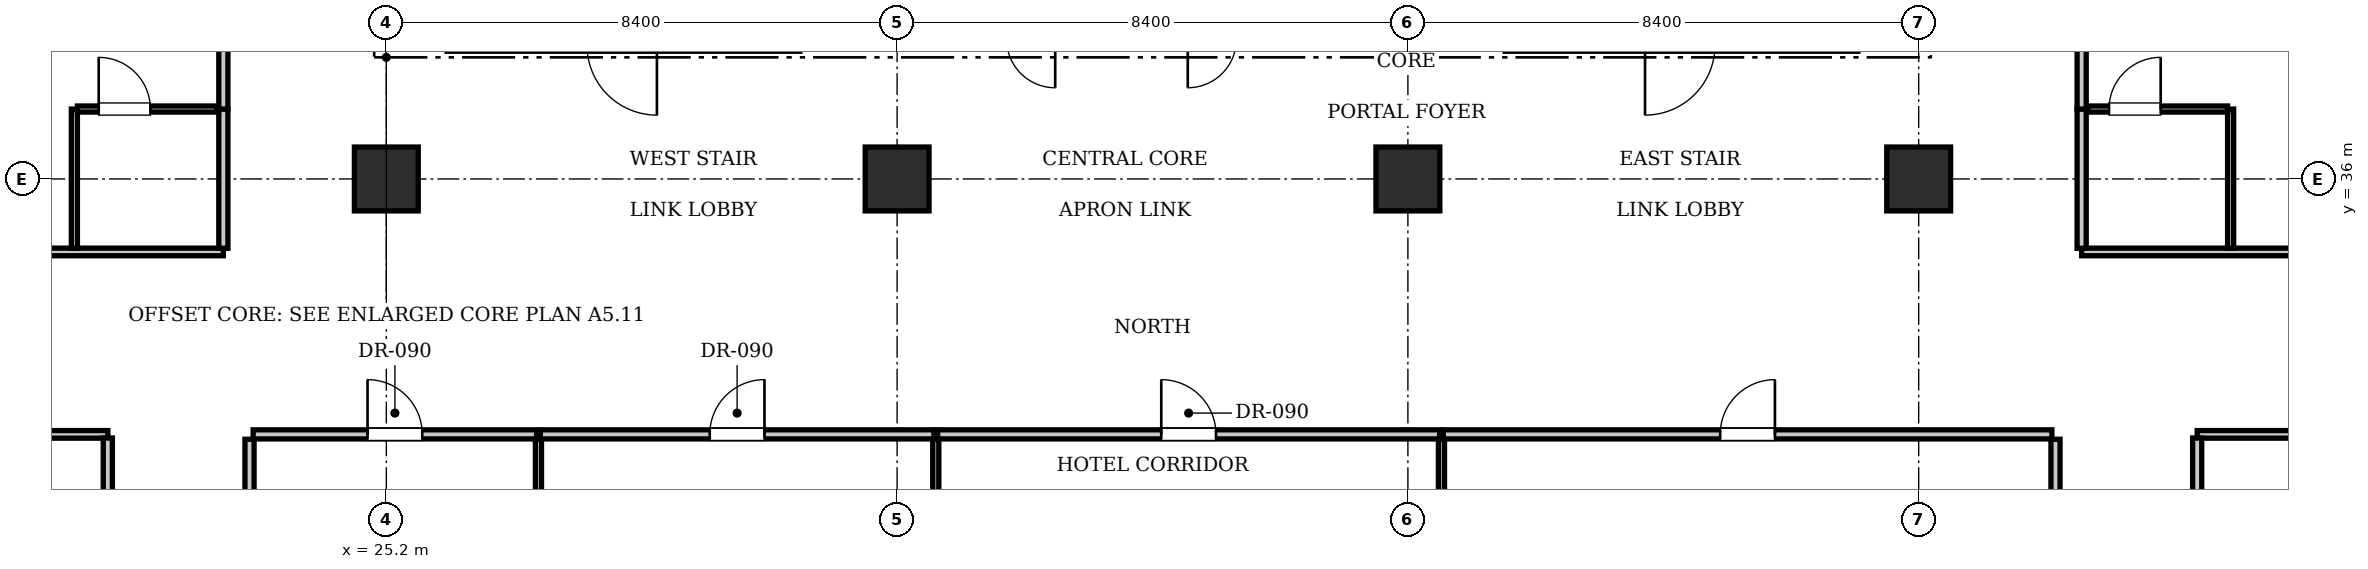
"""IFC4 building model, lengths in metres.
Left out: names, types, materials, properties, quantities, classifications, styles, units other than length and angle.
Written with IfcOpenShell. Run it as: python <this file> out.ifc"""

import sys

from ifc_helpers import new_model, si_unit, direction, frame, frame_2d, origin, origin_2d, place, context, subcontext, project, spatial, rectangle, extrude, element, fill, save


model = new_model("IFC4")
c1 = context("Model", 3, precision=1e-05, world=origin(), true_north=direction((0.0, 1.0)))
c2 = subcontext(c1, "Body", "Model", "MODEL_VIEW")
j1 = project(units=[si_unit("LENGTHUNIT", "METRE"), si_unit("PLANEANGLEUNIT", "RADIAN")], contexts=[c1])
p1 = place(None, origin())
s1 = spatial("IfcSite", under=j1, at=p1, CompositionType="ELEMENT")
p2 = place(p1, origin())
s2 = spatial("IfcBuilding", under=s1, at=p2, CompositionType="ELEMENT")
p3 = place(p2, frame((0.0, 0.0, 96.25)))
s3 = spatial("IfcBuildingStorey", under=s2, at=p3, CompositionType="ELEMENT", Elevation=96.25)
for number, where, z_axis, x_axis in (
    (1, (25.2, 36.0, 0.0), (0.0, 0.0, 1.0), (1.0, 0.0, 0.0)),
    (2, (33.6, 36.0, 0.0), (0.0, 0.0, 1.0), (1.0, 0.0, 0.0)),
    (3, (42.0, 36.0, 0.0), (0.0, 0.0, 1.0), (1.0, 0.0, 0.0)),
    (4, (50.4, 36.0, 0.0), (0.0, 0.0, 1.0), (1.0, 0.0, 0.0)),
):
    element("IfcColumn", number, at=place(p3, frame(where, z_axis=z_axis, x_axis=x_axis)), inside=s3, PredefinedType="COLUMN", context=c2, shape_type="SweptSolid", body=[
        extrude(rectangle(XDim=1.05, YDim=1.05, at=origin_2d()), origin(), (0.0, 0.0, 1.0), 3.85),
    ])
for number, where, z_axis, x_axis in (
    (5, (22.95, 23.28, 0.0), (0.0, 0.0, 1.0), (0.0, 1.0, 0.0)),
    (6, (52.65, 23.28, 0.0), (0.0, 0.0, 1.0), (0.0, 1.0, 0.0)),
):
    element("IfcWall", number, at=place(p3, frame(where, z_axis=z_axis, x_axis=x_axis)), inside=s3, PredefinedType="PARTITIONING", context=c2, shape_type="SweptSolid", body=[
        extrude(rectangle(XDim=8.44, YDim=0.15, at=frame_2d((4.22, 0.0))), origin(), (0.0, 0.0, 1.0), 3.61),
    ])
p4 = place(p3, frame((23.01, 31.8, 0.0), z_axis=(0.0, 0.0, 1.0), x_axis=(1.0, 0.0, 0.0)))
e7 = element("IfcWall", 7, at=p4, inside=s3, PredefinedType="PARTITIONING", context=c2, shape_type="SweptSolid", body=[
    extrude(rectangle(XDim=4.662, YDim=0.15, at=frame_2d((2.331, 0.0))), origin(), (0.0, 0.0, 1.0), 3.61),
])
p5 = place(p4, frame((1.881, 0.0, 0.0)))
e8 = element("IfcOpeningElement", 8, at=p5, cuts=e7, PredefinedType="OPENING", context=c2, shape_type="SweptSolid", body=[
    extrude(rectangle(XDim=0.9, YDim=2.1, at=frame_2d((0.45, 1.05))), frame((0.0, 0.085, 0.0), z_axis=(0.0, -1.0, 0.0), x_axis=(1.0, 0.0, 0.0)), (0.0, 0.0, 1.0), 0.17),
])
p6 = place(p3, frame((27.702, 23.28, 0.0), z_axis=(0.0, 0.0, 1.0), x_axis=(0.0, 1.0, 0.0)))
e9 = element("IfcWall", 9, at=p6, inside=s3, PredefinedType="PARTITIONING", context=c2, shape_type="SweptSolid", body=[
    extrude(rectangle(XDim=8.44, YDim=0.1, at=frame_2d((4.22, 0.0))), origin(), (0.0, 0.0, 1.0), 3.61),
])
p7 = place(p3, frame((27.732, 31.8, 0.0), z_axis=(0.0, 0.0, 1.0), x_axis=(1.0, 0.0, 0.0)))
e10 = element("IfcWall", 10, at=p7, inside=s3, PredefinedType="PARTITIONING", context=c2, shape_type="SweptSolid", body=[
    extrude(rectangle(XDim=6.474, YDim=0.15, at=frame_2d((3.237, 0.0))), origin(), (0.0, 0.0, 1.0), 3.61),
])
p8 = place(p7, frame((2.787, 0.0, 0.0)))
e11 = element("IfcOpeningElement", 11, at=p8, cuts=e10, PredefinedType="OPENING", context=c2, shape_type="SweptSolid", body=[
    extrude(rectangle(XDim=0.9, YDim=2.1, at=frame_2d((0.45, 1.05))), frame((0.0, 0.085, 0.0), z_axis=(0.0, -1.0, 0.0), x_axis=(1.0, 0.0, 0.0)), (0.0, 0.0, 1.0), 0.17),
])
p9 = place(p3, frame((34.236, 23.28, 0.0), z_axis=(0.0, 0.0, 1.0), x_axis=(0.0, 1.0, 0.0)))
e12 = element("IfcWall", 12, at=p9, inside=s3, PredefinedType="PARTITIONING", context=c2, shape_type="SweptSolid", body=[
    extrude(rectangle(XDim=8.44, YDim=0.1, at=frame_2d((4.22, 0.0))), origin(), (0.0, 0.0, 1.0), 3.61),
])
p10 = place(p3, frame((34.266, 31.8, 0.0), z_axis=(0.0, 0.0, 1.0), x_axis=(1.0, 0.0, 0.0)))
e13 = element("IfcWall", 13, at=p10, inside=s3, PredefinedType="PARTITIONING", context=c2, shape_type="SweptSolid", body=[
    extrude(rectangle(XDim=8.256, YDim=0.15, at=frame_2d((4.128, 0.0))), origin(), (0.0, 0.0, 1.0), 3.61),
])
p11 = place(p10, frame((3.678, 0.0, 0.0)))
e14 = element("IfcOpeningElement", 14, at=p11, cuts=e13, PredefinedType="OPENING", context=c2, shape_type="SweptSolid", body=[
    extrude(rectangle(XDim=0.9, YDim=2.1, at=frame_2d((0.45, 1.05))), frame((0.0, 0.085, 0.0), z_axis=(0.0, -1.0, 0.0), x_axis=(1.0, 0.0, 0.0)), (0.0, 0.0, 1.0), 0.17),
])
p12 = place(p3, frame((42.552, 23.28, 0.0), z_axis=(0.0, 0.0, 1.0), x_axis=(0.0, 1.0, 0.0)))
e15 = element("IfcWall", 15, at=p12, inside=s3, PredefinedType="PARTITIONING", context=c2, shape_type="SweptSolid", body=[
    extrude(rectangle(XDim=8.44, YDim=0.1, at=frame_2d((4.22, 0.0))), origin(), (0.0, 0.0, 1.0), 3.61),
])
p13 = place(p3, frame((42.582, 31.8, 0.0), z_axis=(0.0, 0.0, 1.0), x_axis=(1.0, 0.0, 0.0)))
e16 = element("IfcWall", 16, at=p13, inside=s3, PredefinedType="PARTITIONING", context=c2, shape_type="SweptSolid", body=[
    extrude(rectangle(XDim=10.008, YDim=0.15, at=frame_2d((5.004, 0.0))), origin(), (0.0, 0.0, 1.0), 3.61),
])
p14 = place(p13, frame((4.554, 0.0, 0.0)))
e17 = element("IfcOpeningElement", 17, at=p14, cuts=e16, PredefinedType="OPENING", context=c2, shape_type="SweptSolid", body=[
    extrude(rectangle(XDim=0.9, YDim=2.1, at=frame_2d((0.45, 1.05))), frame((0.0, 0.085, 0.0), z_axis=(0.0, -1.0, 0.0), x_axis=(1.0, 0.0, 0.0)), (0.0, 0.0, 1.0), 0.17),
])
p15 = place(p3, frame((10.9, 31.8, 0.0), z_axis=(0.0, 0.0, 1.0), x_axis=(1.0, 0.0, 0.0)))
e18 = element("IfcWall", 18, at=p15, inside=s3, PredefinedType="PARTITIONING", context=c2, shape_type="SweptSolid", body=[
    extrude(rectangle(XDim=9.72, YDim=0.125, at=frame_2d((4.86, 0.0))), origin(), (0.0, 0.0, 1.0), 3.61),
])
p16 = place(p3, frame((54.98, 31.8, 0.0), z_axis=(0.0, 0.0, 1.0), x_axis=(1.0, 0.0, 0.0)))
e19 = element("IfcWall", 19, at=p16, inside=s3, PredefinedType="PARTITIONING", context=c2, shape_type="SweptSolid", body=[
    extrude(rectangle(XDim=9.72, YDim=0.125, at=frame_2d((4.86, 0.0))), origin(), (0.0, 0.0, 1.0), 3.61),
])
for number, where, z_axis, x_axis in (
    (20, (20.62, 29.72, 0.0), (0.0, 0.0, 1.0), (0.0, 1.0, 0.0)),
    (21, (54.98, 29.72, 0.0), (0.0, 0.0, 1.0), (0.0, 1.0, 0.0)),
):
    element("IfcWall", number, at=place(p3, frame(where, z_axis=z_axis, x_axis=x_axis)), inside=s3, PredefinedType="PARTITIONING", context=c2, shape_type="SweptSolid", body=[
        extrude(rectangle(XDim=2.02, YDim=0.15, at=frame_2d((1.01, 0.0))), origin(), (0.0, 0.0, 1.0), 3.61),
    ])
p17 = place(p3, frame((10.9, 34.8, 0.0), z_axis=(0.0, 0.0, 1.0), x_axis=(1.0, 0.0, 0.0)))
e22 = element("IfcWall", 22, at=p17, inside=s3, PredefinedType="PARTITIONING", context=c2, shape_type="SweptSolid", body=[
    extrude(rectangle(XDim=11.62, YDim=0.125, at=frame_2d((5.81, 0.0))), origin(), (0.0, 0.0, 1.0), 3.61),
])
p18 = place(p3, frame((53.08, 34.8, 0.0), z_axis=(0.0, 0.0, 1.0), x_axis=(1.0, 0.0, 0.0)))
e23 = element("IfcWall", 23, at=p18, inside=s3, PredefinedType="PARTITIONING", context=c2, shape_type="SweptSolid", body=[
    extrude(rectangle(XDim=11.62, YDim=0.125, at=frame_2d((5.81, 0.0))), origin(), (0.0, 0.0, 1.0), 3.61),
])
p19 = place(p3, frame((22.52, 34.86, 0.0), z_axis=(0.0, 0.0, 1.0), x_axis=(0.0, 1.0, 0.0)))
e24 = element("IfcWall", 24, at=p19, inside=s3, PredefinedType="PARTITIONING", context=c2, shape_type="SweptSolid", body=[
    extrude(rectangle(XDim=2.29, YDim=0.15, at=frame_2d((1.145, 0.0))), origin(), (0.0, 0.0, 1.0), 3.61),
])
p20 = place(p3, frame((22.52, 37.15, 0.0), z_axis=(0.0, 0.0, 1.0), x_axis=(0.0, 1.0, 0.0)))
e25 = element("IfcWall", 25, at=p20, inside=s3, PredefinedType="PARTITIONING", context=c2, shape_type="SweptSolid", body=[
    extrude(rectangle(XDim=5.359, YDim=0.15, at=frame_2d((2.679, 0.0))), origin(), (0.0, 0.0, 1.0), 3.61),
])
p21 = place(p20, frame((2.204, 0.0, 0.0)))
e26 = element("IfcOpeningElement", 26, at=p21, cuts=e25, PredefinedType="OPENING", context=c2, shape_type="SweptSolid", body=[
    extrude(rectangle(XDim=0.95, YDim=2.15, at=frame_2d((0.475, 1.075))), frame((0.0, 0.085, 0.0), z_axis=(0.0, -1.0, 0.0), x_axis=(1.0, 0.0, 0.0)), (0.0, 0.0, 1.0), 0.17),
])
p22 = place(p3, frame((20.07, 34.86, 0.0), z_axis=(0.0, 0.0, 1.0), x_axis=(0.0, 1.0, 0.0)))
e27 = element("IfcWall", 27, at=p22, inside=s3, PredefinedType="PARTITIONING", context=c2, shape_type="SweptSolid", body=[
    extrude(rectangle(XDim=2.29, YDim=0.1, at=frame_2d((1.145, 0.0))), origin(), (0.0, 0.0, 1.0), 3.61),
])
p23 = place(p3, frame((20.12, 37.15, 0.0), z_axis=(0.0, 0.0, 1.0), x_axis=(1.0, 0.0, 0.0)))
e28 = element("IfcWall", 28, at=p23, inside=s3, PredefinedType="PARTITIONING", context=c2, shape_type="SweptSolid", body=[
    extrude(rectangle(XDim=2.3, YDim=0.1, at=frame_2d((1.15, 0.0))), origin(), (0.0, 0.0, 1.0), 3.61),
])
p24 = place(p23, frame((0.35, 0.0, 0.0)))
e29 = element("IfcOpeningElement", 29, at=p24, cuts=e28, PredefinedType="OPENING", context=c2, shape_type="SweptSolid", body=[
    extrude(rectangle(XDim=0.85, YDim=2.1, at=frame_2d((0.425, 1.05))), frame((0.0, 0.06, 0.0), z_axis=(0.0, -1.0, 0.0), x_axis=(1.0, 0.0, 0.0)), (0.0, 0.0, 1.0), 0.12),
])
p25 = place(p3, frame((53.08, 34.86, 0.0), z_axis=(0.0, 0.0, 1.0), x_axis=(0.0, 1.0, 0.0)))
e30 = element("IfcWall", 30, at=p25, inside=s3, PredefinedType="PARTITIONING", context=c2, shape_type="SweptSolid", body=[
    extrude(rectangle(XDim=2.29, YDim=0.15, at=frame_2d((1.145, 0.0))), origin(), (0.0, 0.0, 1.0), 3.61),
])
p26 = place(p3, frame((53.08, 37.15, 0.0), z_axis=(0.0, 0.0, 1.0), x_axis=(0.0, 1.0, 0.0)))
e31 = element("IfcWall", 31, at=p26, inside=s3, PredefinedType="PARTITIONING", context=c2, shape_type="SweptSolid", body=[
    extrude(rectangle(XDim=5.359, YDim=0.15, at=frame_2d((2.679, 0.0))), origin(), (0.0, 0.0, 1.0), 3.61),
])
p27 = place(p26, frame((2.204, 0.0, 0.0)))
e32 = element("IfcOpeningElement", 32, at=p27, cuts=e31, PredefinedType="OPENING", context=c2, shape_type="SweptSolid", body=[
    extrude(rectangle(XDim=0.95, YDim=2.15, at=frame_2d((0.475, 1.075))), frame((0.0, 0.085, 0.0), z_axis=(0.0, -1.0, 0.0), x_axis=(1.0, 0.0, 0.0)), (0.0, 0.0, 1.0), 0.17),
])
p28 = place(p3, frame((55.53, 34.86, 0.0), z_axis=(0.0, 0.0, 1.0), x_axis=(0.0, 1.0, 0.0)))
e33 = element("IfcWall", 33, at=p28, inside=s3, PredefinedType="PARTITIONING", context=c2, shape_type="SweptSolid", body=[
    extrude(rectangle(XDim=2.29, YDim=0.1, at=frame_2d((1.145, 0.0))), origin(), (0.0, 0.0, 1.0), 3.61),
])
p29 = place(p3, frame((53.18, 37.15, 0.0), z_axis=(0.0, 0.0, 1.0), x_axis=(1.0, 0.0, 0.0)))
e34 = element("IfcWall", 34, at=p29, inside=s3, PredefinedType="PARTITIONING", context=c2, shape_type="SweptSolid", body=[
    extrude(rectangle(XDim=2.3, YDim=0.1, at=frame_2d((1.15, 0.0))), origin(), (0.0, 0.0, 1.0), 3.61),
])
p30 = place(p29, frame((0.35, 0.0, 0.0)))
e35 = element("IfcOpeningElement", 35, at=p30, cuts=e34, PredefinedType="OPENING", context=c2, shape_type="SweptSolid", body=[
    extrude(rectangle(XDim=0.85, YDim=2.1, at=frame_2d((0.425, 1.05))), frame((0.0, 0.06, 0.0), z_axis=(0.0, -1.0, 0.0), x_axis=(1.0, 0.0, 0.0)), (0.0, 0.0, 1.0), 0.12),
])
p31 = place(p5, origin())
e36 = element("IfcDoor", 36, at=p31, inside=s3, OperationType="SINGLE_SWING_LEFT", PredefinedType="DOOR", context=c2, shape_type="SweptSolid", body=[
    extrude(rectangle(XDim=0.9, YDim=2.1, at=frame_2d((0.45, 1.05))), frame((0.0, 0.025, 0.0), z_axis=(0.0, -1.0, 0.0), x_axis=(1.0, 0.0, 0.0)), (0.0, 0.0, 1.0), 0.05),
])
fill(e8, e36)
p32 = place(p8, origin())
e37 = element("IfcDoor", 37, at=p32, inside=s3, OperationType="SINGLE_SWING_RIGHT", PredefinedType="DOOR", context=c2, shape_type="SweptSolid", body=[
    extrude(rectangle(XDim=0.9, YDim=2.1, at=frame_2d((0.45, 1.05))), frame((0.0, 0.025, 0.0), z_axis=(0.0, -1.0, 0.0), x_axis=(1.0, 0.0, 0.0)), (0.0, 0.0, 1.0), 0.05),
])
fill(e11, e37)
p33 = place(p11, origin())
e38 = element("IfcDoor", 38, at=p33, inside=s3, OperationType="SINGLE_SWING_LEFT", PredefinedType="DOOR", context=c2, shape_type="SweptSolid", body=[
    extrude(rectangle(XDim=0.9, YDim=2.1, at=frame_2d((0.45, 1.05))), frame((0.0, 0.025, 0.0), z_axis=(0.0, -1.0, 0.0), x_axis=(1.0, 0.0, 0.0)), (0.0, 0.0, 1.0), 0.05),
])
fill(e14, e38)
p34 = place(p14, origin())
e39 = element("IfcDoor", 39, at=p34, inside=s3, OperationType="SINGLE_SWING_RIGHT", PredefinedType="DOOR", context=c2, shape_type="SweptSolid", body=[
    extrude(rectangle(XDim=0.9, YDim=2.1, at=frame_2d((0.45, 1.05))), frame((0.0, 0.025, 0.0), z_axis=(0.0, -1.0, 0.0), x_axis=(1.0, 0.0, 0.0)), (0.0, 0.0, 1.0), 0.05),
])
fill(e17, e39)
p35 = place(p24, origin())
e40 = element("IfcDoor", 40, at=p35, inside=s3, OperationType="SINGLE_SWING_LEFT", PredefinedType="DOOR", context=c2, shape_type="SweptSolid", body=[
    extrude(rectangle(XDim=0.85, YDim=2.1, at=frame_2d((0.425, 1.05))), frame((0.0, 0.025, 0.0), z_axis=(0.0, -1.0, 0.0), x_axis=(1.0, 0.0, 0.0)), (0.0, 0.0, 1.0), 0.05),
])
fill(e29, e40)
p36 = place(p30, origin())
e41 = element("IfcDoor", 41, at=p36, inside=s3, OperationType="SINGLE_SWING_RIGHT", PredefinedType="DOOR", context=c2, shape_type="SweptSolid", body=[
    extrude(rectangle(XDim=0.85, YDim=2.1, at=frame_2d((0.425, 1.05))), frame((0.0, 0.025, 0.0), z_axis=(0.0, -1.0, 0.0), x_axis=(1.0, 0.0, 0.0)), (0.0, 0.0, 1.0), 0.05),
])
fill(e35, e41)
save(model, sys.argv[1])
